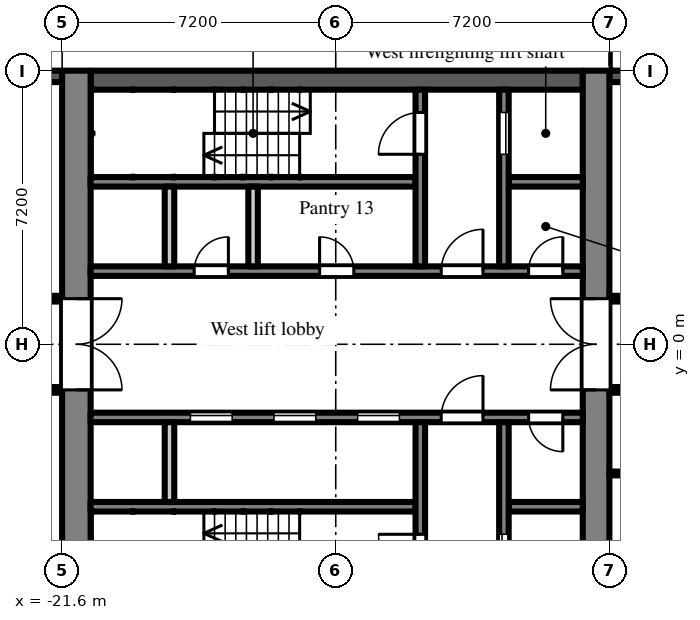
"""IFC4 building model, lengths in metres.
Left out: names, types, materials, properties, quantities, classifications, styles, units other than length and angle.
Written with IfcOpenShell. Run it as: python <this file> out.ifc"""

import sys

from ifc_helpers import new_model, si_unit, direction, frame, frame_2d, origin, place, context, subcontext, project, spatial, rectangle, extrude, element, fill, save


model = new_model("IFC4")
c1 = context("Model", 3, precision=1e-05, world=origin(), true_north=direction((0.0, 1.0)))
c2 = subcontext(c1, "Body", "Model", "MODEL_VIEW")
j1 = project(units=[si_unit("LENGTHUNIT", "METRE"), si_unit("PLANEANGLEUNIT", "RADIAN")], contexts=[c1])
p1 = place(None, origin())
s1 = spatial("IfcSite", under=j1, at=p1, CompositionType="ELEMENT")
p2 = place(p1, origin())
s2 = spatial("IfcBuilding", under=s1, at=p2, CompositionType="ELEMENT")
p3 = place(p2, frame((0.0, 0.0, 84.9)))
s3 = spatial("IfcBuildingStorey", under=s2, at=p3, CompositionType="ELEMENT", Elevation=84.9)
p4 = place(p3, frame((-4.2, 7.05, 0.0), z_axis=(0.0, 0.0, 1.0), x_axis=(-1.0, 0.0, 0.0)))
e1 = element("IfcWall", 1, at=p4, inside=s3, PredefinedType="SOLIDWALL", context=c2, shape_type="SweptSolid", body=[
    extrude(rectangle(XDim=3.0, YDim=0.3, at=frame_2d((1.5, 0.0))), origin(), (0.0, 0.0, 1.0), 2.1),
])
p5 = place(p3, frame((-21.6, 7.05, 0.0), z_axis=(0.0, 0.0, 1.0), x_axis=(-1.0, 0.0, 0.0)))
e2 = element("IfcWall", 2, at=p5, inside=s3, PredefinedType="SOLIDWALL", context=c2, shape_type="SweptSolid", body=[
    extrude(rectangle(XDim=2.7, YDim=0.3, at=frame_2d((1.35, 0.0))), origin(), (0.0, 0.0, 1.0), 2.1),
])
p6 = place(p5, frame((0.75, 0.0, 0.2)))
e3 = element("IfcOpeningElement", 3, at=p6, cuts=e2, PredefinedType="OPENING", context=c2, shape_type="SweptSolid", body=[
    extrude(rectangle(XDim=1.2, YDim=1.85, at=frame_2d((0.6, 0.925))), frame((0.0, 0.16, 0.0), z_axis=(0.0, -1.0, 0.0), x_axis=(1.0, 0.0, 0.0)), (0.0, 0.0, 1.0), 0.32),
])
p7 = place(p3, frame((-7.55, -7.2, 0.0), z_axis=(0.0, 0.0, 1.0), x_axis=(0.0, 1.0, 0.0)))
e4 = element("IfcWall", 4, at=p7, inside=s3, PredefinedType="SHEAR", context=c2, shape_type="SweptSolid", body=[
    extrude(rectangle(XDim=14.4, YDim=0.7, at=frame_2d((7.2, 0.0))), origin(), (0.0, 0.0, 1.0), 2.575),
])
p8 = place(p7, frame((6.0, 0.0, 0.0)))
e5 = element("IfcOpeningElement", 5, at=p8, cuts=e4, PredefinedType="OPENING", context=c2, shape_type="SweptSolid", body=[
    extrude(rectangle(XDim=2.4, YDim=2.2, at=frame_2d((1.2, 1.1))), frame((0.0, 0.36, 0.0), z_axis=(0.0, -1.0, 0.0), x_axis=(1.0, 0.0, 0.0)), (0.0, 0.0, 1.0), 0.72),
])
p9 = place(p3, frame((-21.225, -7.2, 0.0), z_axis=(0.0, 0.0, 1.0), x_axis=(0.0, 1.0, 0.0)))
e6 = element("IfcWall", 6, at=p9, inside=s3, PredefinedType="SHEAR", context=c2, shape_type="SweptSolid", body=[
    extrude(rectangle(XDim=14.4, YDim=0.75, at=frame_2d((7.2, 0.0))), origin(), (0.0, 0.0, 1.0), 2.575),
])
p10 = place(p9, frame((6.0, 0.0, 0.0)))
e7 = element("IfcOpeningElement", 7, at=p10, cuts=e6, PredefinedType="OPENING", context=c2, shape_type="SweptSolid", body=[
    extrude(rectangle(XDim=2.4, YDim=2.2, at=frame_2d((1.2, 1.1))), frame((0.0, 0.385, 0.0), z_axis=(0.0, -1.0, 0.0), x_axis=(1.0, 0.0, 0.0)), (0.0, 0.0, 1.0), 0.77),
])
p11 = place(p3, frame((-7.9, 6.95, 0.0), z_axis=(0.0, 0.0, 1.0), x_axis=(-1.0, 0.0, 0.0)))
e8 = element("IfcWall", 8, at=p11, inside=s3, PredefinedType="SHEAR", context=c2, shape_type="SweptSolid", body=[
    extrude(rectangle(XDim=12.95, YDim=0.5, at=frame_2d((6.475, 0.0))), origin(), (0.0, 0.0, 1.0), 2.575),
])
p12 = place(p3, frame((-7.9, 1.925, 0.0), z_axis=(0.0, 0.0, 1.0), x_axis=(-1.0, 0.0, 0.0)))
e9 = element("IfcWall", 9, at=p12, inside=s3, PredefinedType="SHEAR", context=c2, shape_type="SweptSolid", body=[
    extrude(rectangle(XDim=12.95, YDim=0.25, at=frame_2d((6.475, 0.0))), origin(), (0.0, 0.0, 1.0), 2.575),
])
p13 = place(p12, frame((0.525, 0.0, 0.0)))
e10 = element("IfcOpeningElement", 10, at=p13, cuts=e9, PredefinedType="OPENING", context=c2, shape_type="SweptSolid", body=[
    extrude(rectangle(XDim=0.9, YDim=2.1, at=frame_2d((0.45, 1.05))), frame((0.0, 0.135, 0.0), z_axis=(0.0, -1.0, 0.0), x_axis=(1.0, 0.0, 0.0)), (0.0, 0.0, 1.0), 0.27),
])
p14 = place(p12, frame((2.625, 0.0, 0.0)))
e11 = element("IfcOpeningElement", 11, at=p14, cuts=e9, PredefinedType="OPENING", context=c2, shape_type="SweptSolid", body=[
    extrude(rectangle(XDim=1.1, YDim=2.1, at=frame_2d((0.55, 1.05))), frame((0.0, 0.135, 0.0), z_axis=(0.0, -1.0, 0.0), x_axis=(1.0, 0.0, 0.0)), (0.0, 0.0, 1.0), 0.27),
])
p15 = place(p12, frame((6.025, 0.0, 0.0)))
e12 = element("IfcOpeningElement", 12, at=p15, cuts=e9, PredefinedType="OPENING", context=c2, shape_type="SweptSolid", body=[
    extrude(rectangle(XDim=0.9, YDim=2.1, at=frame_2d((0.45, 1.05))), frame((0.0, 0.135, 0.0), z_axis=(0.0, -1.0, 0.0), x_axis=(1.0, 0.0, 0.0)), (0.0, 0.0, 1.0), 0.27),
])
p16 = place(p12, frame((9.325, 0.0, 0.0)))
e13 = element("IfcOpeningElement", 13, at=p16, cuts=e9, PredefinedType="OPENING", context=c2, shape_type="SweptSolid", body=[
    extrude(rectangle(XDim=0.9, YDim=2.1, at=frame_2d((0.45, 1.05))), frame((0.0, 0.135, 0.0), z_axis=(0.0, -1.0, 0.0), x_axis=(1.0, 0.0, 0.0)), (0.0, 0.0, 1.0), 0.27),
])
p17 = place(p3, frame((-7.9, 4.275, 0.0), z_axis=(0.0, 0.0, 1.0), x_axis=(-1.0, 0.0, 0.0)))
e14 = element("IfcWall", 14, at=p17, inside=s3, PredefinedType="SHEAR", context=c2, shape_type="SweptSolid", body=[
    extrude(rectangle(XDim=1.95, YDim=0.25, at=frame_2d((0.975, 0.0))), origin(), (0.0, 0.0, 1.0), 2.575),
])
p18 = place(p3, frame((-12.3, 4.275, 0.0), z_axis=(0.0, 0.0, 1.0), x_axis=(-1.0, 0.0, 0.0)))
e15 = element("IfcWall", 15, at=p18, inside=s3, PredefinedType="SHEAR", context=c2, shape_type="SweptSolid", body=[
    extrude(rectangle(XDim=8.55, YDim=0.25, at=frame_2d((4.275, 0.0))), origin(), (0.0, 0.0, 1.0), 2.575),
])
p19 = place(p3, frame((-9.975, 2.05, 0.0), z_axis=(0.0, 0.0, 1.0), x_axis=(0.0, 1.0, 0.0)))
e16 = element("IfcWall", 16, at=p19, inside=s3, PredefinedType="SHEAR", context=c2, shape_type="SweptSolid", body=[
    extrude(rectangle(XDim=4.65, YDim=0.25, at=frame_2d((2.325, 0.0))), origin(), (0.0, 0.0, 1.0), 2.575),
])
p20 = place(p19, frame((2.95, 0.0, 0.0)))
e17 = element("IfcOpeningElement", 17, at=p20, cuts=e16, PredefinedType="OPENING", context=c2, shape_type="SweptSolid", body=[
    extrude(rectangle(XDim=1.1, YDim=2.1, at=frame_2d((0.55, 1.05))), frame((0.0, 0.135, 0.0), z_axis=(0.0, -1.0, 0.0), x_axis=(1.0, 0.0, 0.0)), (0.0, 0.0, 1.0), 0.27),
])
p21 = place(p3, frame((-12.175, 2.05, 0.0), z_axis=(0.0, 0.0, 1.0), x_axis=(0.0, 1.0, 0.0)))
e18 = element("IfcWall", 18, at=p21, inside=s3, PredefinedType="SHEAR", context=c2, shape_type="SweptSolid", body=[
    extrude(rectangle(XDim=4.65, YDim=0.25, at=frame_2d((2.325, 0.0))), origin(), (0.0, 0.0, 1.0), 2.575),
])
p22 = place(p21, frame((2.95, 0.0, 0.0)))
e19 = element("IfcOpeningElement", 19, at=p22, cuts=e18, PredefinedType="OPENING", context=c2, shape_type="SweptSolid", body=[
    extrude(rectangle(XDim=1.1, YDim=2.1, at=frame_2d((0.55, 1.05))), frame((0.0, 0.135, 0.0), z_axis=(0.0, -1.0, 0.0), x_axis=(1.0, 0.0, 0.0)), (0.0, 0.0, 1.0), 0.27),
])
for number, where, z_axis, x_axis in (
    (20, (-16.575, 2.05, 0.0), (0.0, 0.0, 1.0), (0.0, 1.0, 0.0)),
    (21, (-18.775, 2.05, 0.0), (0.0, 0.0, 1.0), (0.0, 1.0, 0.0)),
):
    element("IfcWall", number, at=place(p3, frame(where, z_axis=z_axis, x_axis=x_axis)), inside=s3, PredefinedType="PARTITIONING", context=c2, shape_type="SweptSolid", body=[
        extrude(rectangle(XDim=2.1, YDim=0.25, at=frame_2d((1.05, 0.0))), origin(), (0.0, 0.0, 1.0), 2.575),
    ])
p23 = place(p3, frame((-7.9, -1.925, 0.0), z_axis=(0.0, 0.0, 1.0), x_axis=(-1.0, 0.0, 0.0)))
e22 = element("IfcWall", 22, at=p23, inside=s3, PredefinedType="SHEAR", context=c2, shape_type="SweptSolid", body=[
    extrude(rectangle(XDim=12.95, YDim=0.25, at=frame_2d((6.475, 0.0))), origin(), (0.0, 0.0, 1.0), 2.575),
])
p24 = place(p23, frame((4.825, 0.0, 0.0)))
e23 = element("IfcOpeningElement", 23, at=p24, cuts=e22, PredefinedType="OPENING", context=c2, shape_type="SweptSolid", body=[
    extrude(rectangle(XDim=1.1, YDim=2.1, at=frame_2d((0.55, 1.05))), frame((0.0, 0.135, 0.0), z_axis=(0.0, -1.0, 0.0), x_axis=(1.0, 0.0, 0.0)), (0.0, 0.0, 1.0), 0.27),
])
p25 = place(p23, frame((7.025, 0.0, 0.0)))
e24 = element("IfcOpeningElement", 24, at=p25, cuts=e22, PredefinedType="OPENING", context=c2, shape_type="SweptSolid", body=[
    extrude(rectangle(XDim=1.1, YDim=2.1, at=frame_2d((0.55, 1.05))), frame((0.0, 0.135, 0.0), z_axis=(0.0, -1.0, 0.0), x_axis=(1.0, 0.0, 0.0)), (0.0, 0.0, 1.0), 0.27),
])
p26 = place(p23, frame((9.225, 0.0, 0.0)))
e25 = element("IfcOpeningElement", 25, at=p26, cuts=e22, PredefinedType="OPENING", context=c2, shape_type="SweptSolid", body=[
    extrude(rectangle(XDim=1.1, YDim=2.1, at=frame_2d((0.55, 1.05))), frame((0.0, 0.135, 0.0), z_axis=(0.0, -1.0, 0.0), x_axis=(1.0, 0.0, 0.0)), (0.0, 0.0, 1.0), 0.27),
])
p27 = place(p23, frame((0.525, 0.0, 0.0)))
e26 = element("IfcOpeningElement", 26, at=p27, cuts=e22, PredefinedType="OPENING", context=c2, shape_type="SweptSolid", body=[
    extrude(rectangle(XDim=0.9, YDim=2.1, at=frame_2d((0.45, 1.05))), frame((0.0, 0.135, 0.0), z_axis=(0.0, -1.0, 0.0), x_axis=(1.0, 0.0, 0.0)), (0.0, 0.0, 1.0), 0.27),
])
p28 = place(p23, frame((2.625, 0.0, 0.0)))
e27 = element("IfcOpeningElement", 27, at=p28, cuts=e22, PredefinedType="OPENING", context=c2, shape_type="SweptSolid", body=[
    extrude(rectangle(XDim=1.1, YDim=2.1, at=frame_2d((0.55, 1.05))), frame((0.0, 0.135, 0.0), z_axis=(0.0, -1.0, 0.0), x_axis=(1.0, 0.0, 0.0)), (0.0, 0.0, 1.0), 0.27),
])
p29 = place(p3, frame((-7.9, -4.275, 0.0), z_axis=(0.0, 0.0, 1.0), x_axis=(-1.0, 0.0, 0.0)))
e28 = element("IfcWall", 28, at=p29, inside=s3, PredefinedType="SHEAR", context=c2, shape_type="SweptSolid", body=[
    extrude(rectangle(XDim=1.95, YDim=0.25, at=frame_2d((0.975, 0.0))), origin(), (0.0, 0.0, 1.0), 2.575),
])
p30 = place(p3, frame((-12.3, -4.275, 0.0), z_axis=(0.0, 0.0, 1.0), x_axis=(-1.0, 0.0, 0.0)))
e29 = element("IfcWall", 29, at=p30, inside=s3, PredefinedType="SHEAR", context=c2, shape_type="SweptSolid", body=[
    extrude(rectangle(XDim=8.55, YDim=0.25, at=frame_2d((4.275, 0.0))), origin(), (0.0, 0.0, 1.0), 2.575),
])
p31 = place(p3, frame((-9.975, -2.05, 0.0), z_axis=(0.0, 0.0, 1.0), x_axis=(0.0, -1.0, 0.0)))
e30 = element("IfcWall", 30, at=p31, inside=s3, PredefinedType="SHEAR", context=c2, shape_type="SweptSolid", body=[
    extrude(rectangle(XDim=4.65, YDim=0.25, at=frame_2d((2.325, 0.0))), origin(), (0.0, 0.0, 1.0), 2.575),
])
p32 = place(p31, frame((2.95, 0.0, 0.0)))
e31 = element("IfcOpeningElement", 31, at=p32, cuts=e30, PredefinedType="OPENING", context=c2, shape_type="SweptSolid", body=[
    extrude(rectangle(XDim=1.1, YDim=2.1, at=frame_2d((0.55, 1.05))), frame((0.0, 0.135, 0.0), z_axis=(0.0, -1.0, 0.0), x_axis=(1.0, 0.0, 0.0)), (0.0, 0.0, 1.0), 0.27),
])
p33 = place(p3, frame((-12.175, -2.05, 0.0), z_axis=(0.0, 0.0, 1.0), x_axis=(0.0, -1.0, 0.0)))
e32 = element("IfcWall", 32, at=p33, inside=s3, PredefinedType="SHEAR", context=c2, shape_type="SweptSolid", body=[
    extrude(rectangle(XDim=4.65, YDim=0.25, at=frame_2d((2.325, 0.0))), origin(), (0.0, 0.0, 1.0), 2.575),
])
p34 = place(p33, frame((2.95, 0.0, 0.0)))
e33 = element("IfcOpeningElement", 33, at=p34, cuts=e32, PredefinedType="OPENING", context=c2, shape_type="SweptSolid", body=[
    extrude(rectangle(XDim=1.1, YDim=2.1, at=frame_2d((0.55, 1.05))), frame((0.0, 0.135, 0.0), z_axis=(0.0, -1.0, 0.0), x_axis=(1.0, 0.0, 0.0)), (0.0, 0.0, 1.0), 0.27),
])
p35 = place(p3, frame((-18.775, -2.05, 0.0), z_axis=(0.0, 0.0, 1.0), x_axis=(0.0, -1.0, 0.0)))
e34 = element("IfcWall", 34, at=p35, inside=s3, PredefinedType="PARTITIONING", context=c2, shape_type="SweptSolid", body=[
    extrude(rectangle(XDim=2.1, YDim=0.25, at=frame_2d((1.05, 0.0))), origin(), (0.0, 0.0, 1.0), 2.575),
])
p36 = place(p3, frame((-36.5, -1.2, 0.0), z_axis=(0.0, 0.0, 1.0), x_axis=(1.0, 0.0, 0.0)))
e35 = element("IfcWall", 35, at=p36, inside=s3, PredefinedType="PARTITIONING", context=c2, shape_type="SweptSolid", body=[
    extrude(rectangle(XDim=14.9, YDim=0.15, at=frame_2d((7.45, 0.0))), origin(), (0.0, 0.0, 1.0), 2.575),
])
p37 = place(p36, frame((13.3, 0.0, 0.0)))
e36 = element("IfcOpeningElement", 36, at=p37, cuts=e35, PredefinedType="OPENING", context=c2, shape_type="SweptSolid", body=[
    extrude(rectangle(XDim=1.0, YDim=2.1, at=frame_2d((0.5, 1.05))), frame((0.0, 0.085, 0.0), z_axis=(0.0, -1.0, 0.0), x_axis=(1.0, 0.0, 0.0)), (0.0, 0.0, 1.0), 0.17),
])
p38 = place(p36, frame((6.8, 0.0, 0.0)))
e37 = element("IfcOpeningElement", 37, at=p38, cuts=e35, PredefinedType="OPENING", context=c2, shape_type="SweptSolid", body=[
    extrude(rectangle(XDim=1.8, YDim=2.1, at=frame_2d((0.9, 1.05))), frame((0.0, 0.085, 0.0), z_axis=(0.0, -1.0, 0.0), x_axis=(1.0, 0.0, 0.0)), (0.0, 0.0, 1.0), 0.17),
])
p39 = place(p36, frame((1.15, 0.0, 0.0)))
e38 = element("IfcOpeningElement", 38, at=p39, cuts=e35, PredefinedType="OPENING", context=c2, shape_type="SweptSolid", body=[
    extrude(rectangle(XDim=1.8, YDim=2.1, at=frame_2d((0.9, 1.05))), frame((0.0, 0.085, 0.0), z_axis=(0.0, -1.0, 0.0), x_axis=(1.0, 0.0, 0.0)), (0.0, 0.0, 1.0), 0.17),
])
p40 = place(p3, frame((-36.5, 1.2, 0.0), z_axis=(0.0, 0.0, 1.0), x_axis=(1.0, 0.0, 0.0)))
e39 = element("IfcWall", 39, at=p40, inside=s3, PredefinedType="PARTITIONING", context=c2, shape_type="SweptSolid", body=[
    extrude(rectangle(XDim=14.9, YDim=0.15, at=frame_2d((7.45, 0.0))), origin(), (0.0, 0.0, 1.0), 2.575),
])
p41 = place(p40, frame((10.1, 0.0, 0.0)))
e40 = element("IfcOpeningElement", 40, at=p41, cuts=e39, PredefinedType="OPENING", context=c2, shape_type="SweptSolid", body=[
    extrude(rectangle(XDim=1.0, YDim=2.1, at=frame_2d((0.5, 1.05))), frame((0.0, 0.085, 0.0), z_axis=(0.0, -1.0, 0.0), x_axis=(1.0, 0.0, 0.0)), (0.0, 0.0, 1.0), 0.17),
])
p42 = place(p40, frame((6.35, 0.0, 0.0)))
e41 = element("IfcOpeningElement", 41, at=p42, cuts=e39, PredefinedType="OPENING", context=c2, shape_type="SweptSolid", body=[
    extrude(rectangle(XDim=0.9, YDim=2.1, at=frame_2d((0.45, 1.05))), frame((0.0, 0.085, 0.0), z_axis=(0.0, -1.0, 0.0), x_axis=(1.0, 0.0, 0.0)), (0.0, 0.0, 1.0), 0.17),
])
p43 = place(p40, frame((4.55, 0.0, 0.0)))
e42 = element("IfcOpeningElement", 42, at=p43, cuts=e39, PredefinedType="OPENING", context=c2, shape_type="SweptSolid", body=[
    extrude(rectangle(XDim=0.9, YDim=2.1, at=frame_2d((0.45, 1.05))), frame((0.0, 0.085, 0.0), z_axis=(0.0, -1.0, 0.0), x_axis=(1.0, 0.0, 0.0)), (0.0, 0.0, 1.0), 0.17),
])
p44 = place(p40, frame((1.15, 0.0, 0.0)))
e43 = element("IfcOpeningElement", 43, at=p44, cuts=e39, PredefinedType="OPENING", context=c2, shape_type="SweptSolid", body=[
    extrude(rectangle(XDim=1.8, YDim=2.1, at=frame_2d((0.9, 1.05))), frame((0.0, 0.085, 0.0), z_axis=(0.0, -1.0, 0.0), x_axis=(1.0, 0.0, 0.0)), (0.0, 0.0, 1.0), 0.17),
])
p45 = place(p3, frame((-7.2, -3.4, 0.0), z_axis=(0.0, 0.0, 1.0), x_axis=(1.0, 0.0, 0.0)))
e44 = element("IfcWall", 44, at=p45, inside=s3, PredefinedType="PARTITIONING", context=c2, shape_type="SweptSolid", body=[
    extrude(rectangle(XDim=5.925, YDim=0.1, at=frame_2d((2.962, 0.0))), origin(), (0.0, 0.0, 1.0), 2.575),
])
p46 = place(p3, frame((-7.2, -1.2, 0.0), z_axis=(0.0, 0.0, 1.0), x_axis=(1.0, 0.0, 0.0)))
e45 = element("IfcWall", 45, at=p46, inside=s3, PredefinedType="PARTITIONING", context=c2, shape_type="SweptSolid", body=[
    extrude(rectangle(XDim=6.075, YDim=0.15, at=frame_2d((3.038, 0.0))), origin(), (0.0, 0.0, 1.0), 2.575),
])
p47 = place(p46, frame((2.55, 0.0, 0.0)))
e46 = element("IfcOpeningElement", 46, at=p47, cuts=e45, PredefinedType="OPENING", context=c2, shape_type="SweptSolid", body=[
    extrude(rectangle(XDim=0.9, YDim=2.1, at=frame_2d((0.45, 1.05))), frame((0.0, 0.085, 0.0), z_axis=(0.0, -1.0, 0.0), x_axis=(1.0, 0.0, 0.0)), (0.0, 0.0, 1.0), 0.17),
])
p48 = place(p3, frame((-7.2, 1.2, 0.0), z_axis=(0.0, 0.0, 1.0), x_axis=(1.0, 0.0, 0.0)))
e47 = element("IfcWall", 47, at=p48, inside=s3, PredefinedType="PARTITIONING", context=c2, shape_type="SweptSolid", body=[
    extrude(rectangle(XDim=6.075, YDim=0.15, at=frame_2d((3.038, 0.0))), origin(), (0.0, 0.0, 1.0), 2.575),
])
p49 = place(p24, origin())
e48 = element("IfcDoor", 48, at=p49, inside=s3, OperationType="SLIDING_TO_LEFT", PredefinedType="DOOR", context=c2, shape_type="SweptSolid", body=[
    extrude(rectangle(XDim=1.1, YDim=2.1, at=frame_2d((0.55, 1.05))), frame((0.0, 0.025, 0.0), z_axis=(0.0, -1.0, 0.0), x_axis=(1.0, 0.0, 0.0)), (0.0, 0.0, 1.0), 0.05),
])
fill(e23, e48)
p50 = place(p25, origin())
e49 = element("IfcDoor", 49, at=p50, inside=s3, OperationType="SLIDING_TO_LEFT", PredefinedType="DOOR", context=c2, shape_type="SweptSolid", body=[
    extrude(rectangle(XDim=1.1, YDim=2.1, at=frame_2d((0.55, 1.05))), frame((0.0, 0.025, 0.0), z_axis=(0.0, -1.0, 0.0), x_axis=(1.0, 0.0, 0.0)), (0.0, 0.0, 1.0), 0.05),
])
fill(e24, e49)
p51 = place(p26, origin())
e50 = element("IfcDoor", 50, at=p51, inside=s3, OperationType="SLIDING_TO_LEFT", PredefinedType="DOOR", context=c2, shape_type="SweptSolid", body=[
    extrude(rectangle(XDim=1.1, YDim=2.1, at=frame_2d((0.55, 1.05))), frame((0.0, 0.025, 0.0), z_axis=(0.0, -1.0, 0.0), x_axis=(1.0, 0.0, 0.0)), (0.0, 0.0, 1.0), 0.05),
])
fill(e25, e50)
p52 = place(p20, origin())
e51 = element("IfcDoor", 51, at=p52, inside=s3, OperationType="SLIDING_TO_LEFT", PredefinedType="DOOR", context=c2, shape_type="SweptSolid", body=[
    extrude(rectangle(XDim=1.1, YDim=2.1, at=frame_2d((0.55, 1.05))), frame((0.0, 0.025, 0.0), z_axis=(0.0, -1.0, 0.0), x_axis=(1.0, 0.0, 0.0)), (0.0, 0.0, 1.0), 0.05),
])
fill(e17, e51)
p53 = place(p32, origin())
e52 = element("IfcDoor", 52, at=p53, inside=s3, OperationType="SLIDING_TO_LEFT", PredefinedType="DOOR", context=c2, shape_type="SweptSolid", body=[
    extrude(rectangle(XDim=1.1, YDim=2.1, at=frame_2d((0.55, 1.05))), frame((0.0, 0.025, 0.0), z_axis=(0.0, -1.0, 0.0), x_axis=(1.0, 0.0, 0.0)), (0.0, 0.0, 1.0), 0.05),
])
fill(e31, e52)
p54 = place(p22, origin())
e53 = element("IfcDoor", 53, at=p54, inside=s3, OperationType="SINGLE_SWING_LEFT", PredefinedType="DOOR", context=c2, shape_type="SweptSolid", body=[
    extrude(rectangle(XDim=1.1, YDim=2.1, at=frame_2d((0.55, 1.05))), frame((0.0, 0.025, 0.0), z_axis=(0.0, -1.0, 0.0), x_axis=(1.0, 0.0, 0.0)), (0.0, 0.0, 1.0), 0.05),
])
fill(e19, e53)
p55 = place(p34, frame((1.1, 0.0, 0.0), z_axis=(0.0, 0.0, 1.0), x_axis=(-1.0, 0.0, 0.0)))
e54 = element("IfcDoor", 54, at=p55, inside=s3, OperationType="SINGLE_SWING_RIGHT", PredefinedType="DOOR", context=c2, shape_type="SweptSolid", body=[
    extrude(rectangle(XDim=1.1, YDim=2.1, at=frame_2d((0.55, 1.05))), frame((0.0, 0.025, 0.0), z_axis=(0.0, -1.0, 0.0), x_axis=(1.0, 0.0, 0.0)), (0.0, 0.0, 1.0), 0.05),
])
fill(e33, e54)
p56 = place(p13, frame((0.9, 0.0, 0.0), z_axis=(0.0, 0.0, 1.0), x_axis=(-1.0, 0.0, 0.0)))
e55 = element("IfcDoor", 55, at=p56, inside=s3, OperationType="SINGLE_SWING_RIGHT", PredefinedType="DOOR", context=c2, shape_type="SweptSolid", body=[
    extrude(rectangle(XDim=0.9, YDim=2.1, at=frame_2d((0.45, 1.05))), frame((0.0, 0.025, 0.0), z_axis=(0.0, -1.0, 0.0), x_axis=(1.0, 0.0, 0.0)), (0.0, 0.0, 1.0), 0.05),
])
fill(e10, e55)
p57 = place(p27, origin())
e56 = element("IfcDoor", 56, at=p57, inside=s3, OperationType="SINGLE_SWING_LEFT", PredefinedType="DOOR", context=c2, shape_type="SweptSolid", body=[
    extrude(rectangle(XDim=0.9, YDim=2.1, at=frame_2d((0.45, 1.05))), frame((0.0, 0.025, 0.0), z_axis=(0.0, -1.0, 0.0), x_axis=(1.0, 0.0, 0.0)), (0.0, 0.0, 1.0), 0.05),
])
fill(e26, e56)
p58 = place(p14, frame((1.1, 0.0, 0.0), z_axis=(0.0, 0.0, 1.0), x_axis=(-1.0, 0.0, 0.0)))
e57 = element("IfcDoor", 57, at=p58, inside=s3, OperationType="SINGLE_SWING_RIGHT", PredefinedType="DOOR", context=c2, shape_type="SweptSolid", body=[
    extrude(rectangle(XDim=1.1, YDim=2.1, at=frame_2d((0.55, 1.05))), frame((0.0, 0.025, 0.0), z_axis=(0.0, -1.0, 0.0), x_axis=(1.0, 0.0, 0.0)), (0.0, 0.0, 1.0), 0.05),
])
fill(e11, e57)
p59 = place(p28, frame((1.1, 0.0, 0.0), z_axis=(0.0, 0.0, 1.0), x_axis=(-1.0, 0.0, 0.0)))
e58 = element("IfcDoor", 58, at=p59, inside=s3, OperationType="SINGLE_SWING_RIGHT", PredefinedType="DOOR", context=c2, shape_type="SweptSolid", body=[
    extrude(rectangle(XDim=1.1, YDim=2.1, at=frame_2d((0.55, 1.05))), frame((0.0, 0.025, 0.0), z_axis=(0.0, -1.0, 0.0), x_axis=(1.0, 0.0, 0.0)), (0.0, 0.0, 1.0), 0.05),
])
fill(e27, e58)
p60 = place(p8, origin())
e59 = element("IfcDoor", 59, at=p60, inside=s3, OperationType="DOUBLE_DOOR_DOUBLE_SWING", PredefinedType="DOOR", context=c2, shape_type="SweptSolid", body=[
    extrude(rectangle(XDim=2.4, YDim=2.2, at=frame_2d((1.2, 1.1))), frame((0.0, 0.025, 0.0), z_axis=(0.0, -1.0, 0.0), x_axis=(1.0, 0.0, 0.0)), (0.0, 0.0, 1.0), 0.05),
])
fill(e5, e59)
p61 = place(p10, frame((2.4, 0.0, 0.0), z_axis=(0.0, 0.0, 1.0), x_axis=(-1.0, 0.0, 0.0)))
e60 = element("IfcDoor", 60, at=p61, inside=s3, OperationType="DOUBLE_DOOR_DOUBLE_SWING", PredefinedType="DOOR", context=c2, shape_type="SweptSolid", body=[
    extrude(rectangle(XDim=2.4, YDim=2.2, at=frame_2d((1.2, 1.1))), frame((0.0, 0.025, 0.0), z_axis=(0.0, -1.0, 0.0), x_axis=(1.0, 0.0, 0.0)), (0.0, 0.0, 1.0), 0.05),
])
fill(e7, e60)
p62 = place(p15, frame((0.9, 0.0, 0.0), z_axis=(0.0, 0.0, 1.0), x_axis=(-1.0, 0.0, 0.0)))
e61 = element("IfcDoor", 61, at=p62, inside=s3, OperationType="SINGLE_SWING_LEFT", PredefinedType="DOOR", context=c2, shape_type="SweptSolid", body=[
    extrude(rectangle(XDim=0.9, YDim=2.1, at=frame_2d((0.45, 1.05))), frame((0.0, 0.025, 0.0), z_axis=(0.0, -1.0, 0.0), x_axis=(1.0, 0.0, 0.0)), (0.0, 0.0, 1.0), 0.05),
])
fill(e12, e61)
p63 = place(p16, frame((0.9, 0.0, 0.0), z_axis=(0.0, 0.0, 1.0), x_axis=(-1.0, 0.0, 0.0)))
e62 = element("IfcDoor", 62, at=p63, inside=s3, OperationType="SINGLE_SWING_RIGHT", PredefinedType="DOOR", context=c2, shape_type="SweptSolid", body=[
    extrude(rectangle(XDim=0.9, YDim=2.1, at=frame_2d((0.45, 1.05))), frame((0.0, 0.025, 0.0), z_axis=(0.0, -1.0, 0.0), x_axis=(1.0, 0.0, 0.0)), (0.0, 0.0, 1.0), 0.05),
])
fill(e13, e62)
save(model, sys.argv[1])
